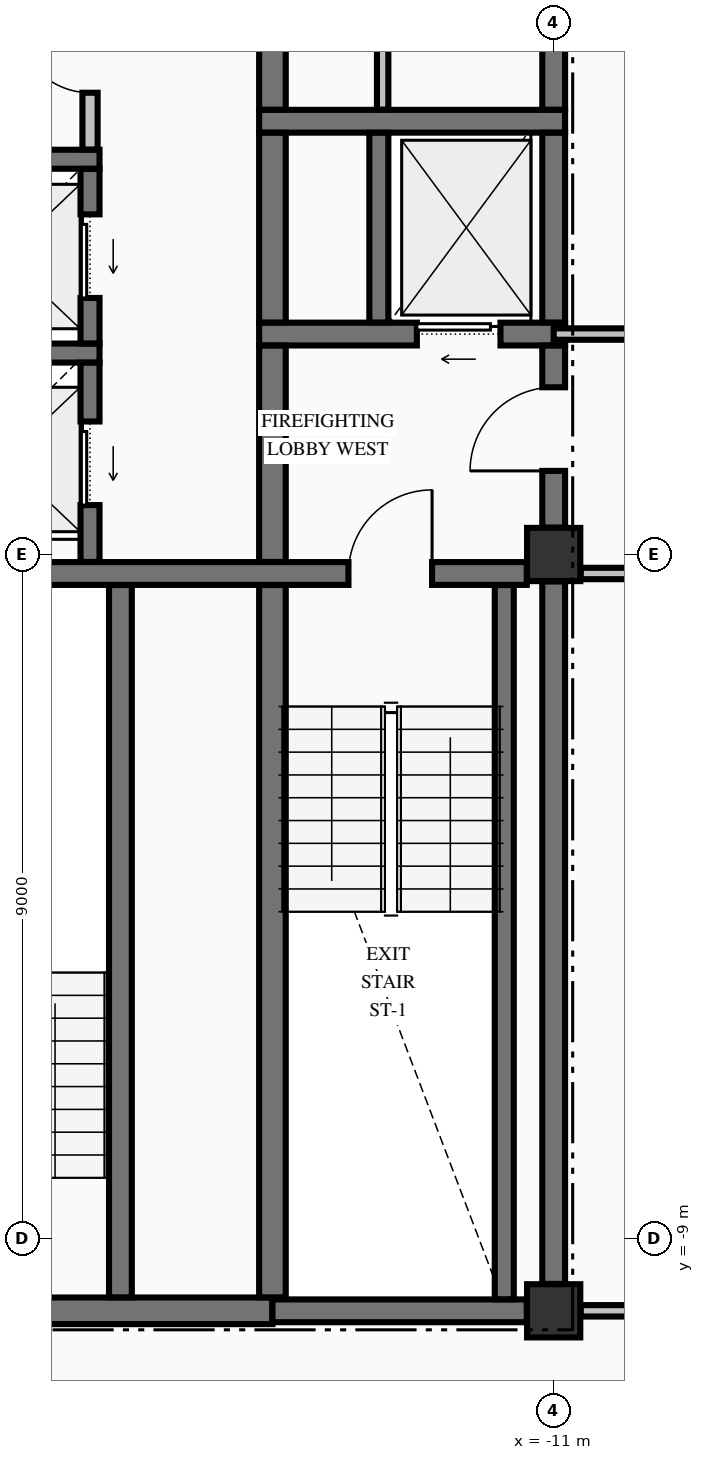
"""IFC4 building model, lengths in metres.
Left out: names, types, materials, properties, quantities, classifications, styles, units other than length and angle.
Written with IfcOpenShell. Run it as: python <this file> out.ifc"""

import sys

from ifc_helpers import new_model, si_unit, direction, frame, frame_2d, origin, origin_2d, place, context, subcontext, project, spatial, rectangle, extrude, element, fill, save


model = new_model("IFC4")
c1 = context("Model", 3, precision=1e-05, world=origin(), true_north=direction((0.0, 1.0)))
c2 = subcontext(c1, "Body", "Model", "MODEL_VIEW")
j1 = project(units=[si_unit("LENGTHUNIT", "METRE"), si_unit("PLANEANGLEUNIT", "RADIAN")], contexts=[c1])
p1 = place(None, origin())
s1 = spatial("IfcSite", under=j1, at=p1, CompositionType="ELEMENT")
p2 = place(p1, origin())
s2 = spatial("IfcBuilding", under=s1, at=p2, CompositionType="ELEMENT")
p3 = place(p2, frame((0.0, 0.0, 267.35)))
s3 = spatial("IfcBuildingStorey", under=s2, at=p3, CompositionType="ELEMENT", Elevation=267.35)
for number, where, z_axis, x_axis in (
    (1, (-11.0, -9.95, -0.25), (0.0, 0.0, 1.0), (1.0, 0.0, 0.0)),
    (2, (-11.0, 0.0, -0.25), (0.0, 0.0, 1.0), (1.0, 0.0, 0.0)),
):
    element("IfcColumn", number, at=place(p3, frame(where, z_axis=z_axis, x_axis=x_axis)), inside=s3, PredefinedType="COLUMN", context=c2, shape_type="SweptSolid", body=[
        extrude(rectangle(XDim=0.7, YDim=0.7, at=origin_2d()), origin(), (0.0, 0.0, 1.0), 3.155),
    ])
p4 = place(p3, frame((-19.646, -9.95, 0.0), z_axis=(0.0, 0.0, 1.0), x_axis=(1.0, 0.0, 0.0)))
e3 = element("IfcWall", 3, at=p4, inside=s3, PredefinedType="SHEAR", context=c2, shape_type="SweptSolid", body=[
    extrude(rectangle(XDim=4.946, YDim=0.35, at=frame_2d((2.473, 0.0))), origin(), (0.0, 0.0, 1.0), 2.905),
])
p5 = place(p4, frame((0.821, 0.0, 0.0)))
e4 = element("IfcOpeningElement", 4, at=p5, cuts=e3, PredefinedType="OPENING", context=c2, shape_type="SweptSolid", body=[
    extrude(rectangle(XDim=1.05, YDim=2.15, at=frame_2d((0.525, 1.075))), frame((0.0, 0.185, 0.0), z_axis=(0.0, -1.0, 0.0), x_axis=(1.0, 0.0, 0.0)), (0.0, 0.0, 1.0), 0.37),
])
p6 = place(p3, frame((-14.7, -9.95, 0.0), z_axis=(0.0, 0.0, 1.0), x_axis=(1.0, 0.0, 0.0)))
e5 = element("IfcWall", 5, at=p6, inside=s3, PredefinedType="SHEAR", context=c2, shape_type="SweptSolid", body=[
    extrude(rectangle(XDim=3.346, YDim=0.3, at=frame_2d((1.673, 0.0))), origin(), (0.0, 0.0, 1.0), 2.905),
])
p7 = place(p3, frame((-19.646, -0.25, 0.0), z_axis=(0.0, 0.0, 1.0), x_axis=(1.0, 0.0, 0.0)))
e6 = element("IfcWall", 6, at=p7, inside=s3, PredefinedType="SHEAR", context=c2, shape_type="SweptSolid", body=[
    extrude(rectangle(XDim=8.292, YDim=0.3, at=frame_2d((4.146, 0.0))), origin(), (0.0, 0.0, 1.0), 2.905),
])
p8 = place(p7, frame((5.946, 0.0, 0.0)))
e7 = element("IfcOpeningElement", 7, at=p8, cuts=e6, PredefinedType="OPENING", context=c2, shape_type="SweptSolid", body=[
    extrude(rectangle(XDim=1.1, YDim=2.15, at=frame_2d((0.55, 1.075))), frame((0.0, 0.16, 0.0), z_axis=(0.0, -1.0, 0.0), x_axis=(1.0, 0.0, 0.0)), (0.0, 0.0, 1.0), 0.32),
])
p9 = place(p3, frame((-20.175, 2.65, 0.0), z_axis=(0.0, 0.0, 1.0), x_axis=(1.0, 0.0, 0.0)))
e8 = element("IfcWall", 8, at=p9, inside=s3, PredefinedType="SOLIDWALL", context=c2, shape_type="SweptSolid", body=[
    extrude(rectangle(XDim=3.2, YDim=0.25, at=frame_2d((1.6, 0.0))), origin(), (0.0, 0.0, 1.0), 2.905),
])
p10 = place(p3, frame((-14.875, 2.9, 0.0), z_axis=(0.0, 0.0, 1.0), x_axis=(1.0, 0.0, 0.0)))
e9 = element("IfcWall", 9, at=p10, inside=s3, PredefinedType="SHEAR", context=c2, shape_type="SweptSolid", body=[
    extrude(rectangle(XDim=4.025, YDim=0.3, at=frame_2d((2.012, 0.0))), origin(), (0.0, 0.0, 1.0), 2.905),
])
p11 = place(p10, frame((2.075, 0.0, 0.0)))
e10 = element("IfcOpeningElement", 10, at=p11, cuts=e9, PredefinedType="OPENING", context=c2, shape_type="SweptSolid", body=[
    extrude(rectangle(XDim=1.1, YDim=2.2, at=frame_2d((0.55, 1.1))), frame((0.0, 0.16, 0.0), z_axis=(0.0, -1.0, 0.0), x_axis=(1.0, 0.0, 0.0)), (0.0, 0.0, 1.0), 0.32),
])
p12 = place(p3, frame((-20.175, 5.2, 0.0), z_axis=(0.0, 0.0, 1.0), x_axis=(1.0, 0.0, 0.0)))
e11 = element("IfcWall", 11, at=p12, inside=s3, PredefinedType="SOLIDWALL", context=c2, shape_type="SweptSolid", body=[
    extrude(rectangle(XDim=3.2, YDim=0.25, at=frame_2d((1.6, 0.0))), origin(), (0.0, 0.0, 1.0), 2.905),
])
p13 = place(p3, frame((-14.875, 5.7, 0.0), z_axis=(0.0, 0.0, 1.0), x_axis=(1.0, 0.0, 0.0)))
e12 = element("IfcWall", 12, at=p13, inside=s3, PredefinedType="SHEAR", context=c2, shape_type="SweptSolid", body=[
    extrude(rectangle(XDim=4.025, YDim=0.3, at=frame_2d((2.012, 0.0))), origin(), (0.0, 0.0, 1.0), 2.905),
])
p14 = place(p3, frame((-10.644, -9.95, 0.0), z_axis=(0.0, 0.0, 1.0), x_axis=(1.0, 0.0, 0.0)))
e13 = element("IfcWall", 13, at=p14, inside=s3, PredefinedType="PARTITIONING", context=c2, shape_type="SweptSolid", body=[
    extrude(rectangle(XDim=21.288, YDim=0.15, at=frame_2d((10.644, 0.0))), origin(), (0.0, 0.0, 1.0), 2.905),
])
p15 = place(p14, frame((14.294, 0.0, 0.0)))
e14 = element("IfcOpeningElement", 14, at=p15, cuts=e13, PredefinedType="OPENING", context=c2, shape_type="SweptSolid", body=[
    extrude(rectangle(XDim=1.1, YDim=2.15, at=frame_2d((0.55, 1.075))), frame((0.0, 0.085, 0.0), z_axis=(0.0, -1.0, 0.0), x_axis=(1.0, 0.0, 0.0)), (0.0, 0.0, 1.0), 0.17),
])
p16 = place(p14, frame((19.719, 0.0, 0.0)))
e15 = element("IfcOpeningElement", 15, at=p16, cuts=e13, PredefinedType="OPENING", context=c2, shape_type="SweptSolid", body=[
    extrude(rectangle(XDim=0.95, YDim=2.15, at=frame_2d((0.475, 1.075))), frame((0.0, 0.085, 0.0), z_axis=(0.0, -1.0, 0.0), x_axis=(1.0, 0.0, 0.0)), (0.0, 0.0, 1.0), 0.17),
])
p17 = place(p3, frame((-10.644, -0.25, 0.0), z_axis=(0.0, 0.0, 1.0), x_axis=(1.0, 0.0, 0.0)))
e16 = element("IfcWall", 16, at=p17, inside=s3, PredefinedType="PARTITIONING", context=c2, shape_type="SweptSolid", body=[
    extrude(rectangle(XDim=21.288, YDim=0.15, at=frame_2d((10.644, 0.0))), origin(), (0.0, 0.0, 1.0), 2.905),
])
p18 = place(p17, frame((14.294, 0.0, 0.0)))
e17 = element("IfcOpeningElement", 17, at=p18, cuts=e16, PredefinedType="OPENING", context=c2, shape_type="SweptSolid", body=[
    extrude(rectangle(XDim=1.1, YDim=2.15, at=frame_2d((0.55, 1.075))), frame((0.0, 0.085, 0.0), z_axis=(0.0, -1.0, 0.0), x_axis=(1.0, 0.0, 0.0)), (0.0, 0.0, 1.0), 0.17),
])
p19 = place(p17, frame((6.169, 0.0, 0.0)))
e18 = element("IfcOpeningElement", 18, at=p19, cuts=e16, PredefinedType="OPENING", context=c2, shape_type="SweptSolid", body=[
    extrude(rectangle(XDim=1.05, YDim=2.15, at=frame_2d((0.525, 1.075))), frame((0.0, 0.085, 0.0), z_axis=(0.0, -1.0, 0.0), x_axis=(1.0, 0.0, 0.0)), (0.0, 0.0, 1.0), 0.17),
])
p20 = place(p17, frame((18.319, 0.0, 0.0)))
e19 = element("IfcOpeningElement", 19, at=p20, cuts=e16, PredefinedType="OPENING", context=c2, shape_type="SweptSolid", body=[
    extrude(rectangle(XDim=0.95, YDim=2.15, at=frame_2d((0.475, 1.075))), frame((0.0, 0.085, 0.0), z_axis=(0.0, -1.0, 0.0), x_axis=(1.0, 0.0, 0.0)), (0.0, 0.0, 1.0), 0.17),
])
p21 = place(p3, frame((-11.0, 2.9, 0.0), z_axis=(0.0, 0.0, 1.0), x_axis=(1.0, 0.0, 0.0)))
e20 = element("IfcWall", 20, at=p21, inside=s3, PredefinedType="PARTITIONING", context=c2, shape_type="SweptSolid", body=[
    extrude(rectangle(XDim=22.0, YDim=0.15, at=frame_2d((11.0, 0.0))), origin(), (0.0, 0.0, 1.0), 2.905),
])
p22 = place(p21, frame((14.65, 0.0, 0.0)))
e21 = element("IfcOpeningElement", 21, at=p22, cuts=e20, PredefinedType="OPENING", context=c2, shape_type="SweptSolid", body=[
    extrude(rectangle(XDim=1.1, YDim=2.15, at=frame_2d((0.55, 1.075))), frame((0.0, 0.085, 0.0), z_axis=(0.0, -1.0, 0.0), x_axis=(1.0, 0.0, 0.0)), (0.0, 0.0, 1.0), 0.17),
])
p23 = place(p21, frame((6.525, 0.0, 0.0)))
e22 = element("IfcOpeningElement", 22, at=p23, cuts=e20, PredefinedType="OPENING", context=c2, shape_type="SweptSolid", body=[
    extrude(rectangle(XDim=1.05, YDim=2.15, at=frame_2d((0.525, 1.075))), frame((0.0, 0.085, 0.0), z_axis=(0.0, -1.0, 0.0), x_axis=(1.0, 0.0, 0.0)), (0.0, 0.0, 1.0), 0.17),
])
p24 = place(p21, frame((18.6, 0.0, 0.0)))
e23 = element("IfcOpeningElement", 23, at=p24, cuts=e20, PredefinedType="OPENING", context=c2, shape_type="SweptSolid", body=[
    extrude(rectangle(XDim=1.1, YDim=2.15, at=frame_2d((0.55, 1.075))), frame((0.0, 0.085, 0.0), z_axis=(0.0, -1.0, 0.0), x_axis=(1.0, 0.0, 0.0)), (0.0, 0.0, 1.0), 0.17),
])
p25 = place(p3, frame((-17.1, -0.098, 0.0), z_axis=(0.0, 0.0, 1.0), x_axis=(0.0, 1.0, 0.0)))
e24 = element("IfcWall", 24, at=p25, inside=s3, PredefinedType="SOLIDWALL", context=c2, shape_type="SweptSolid", body=[
    extrude(rectangle(XDim=2.621, YDim=0.25, at=frame_2d((1.311, 0.0))), origin(), (0.0, 0.0, 1.0), 2.905),
])
p26 = place(p25, frame((0.748, 0.0, 0.0)))
e25 = element("IfcOpeningElement", 25, at=p26, cuts=e24, PredefinedType="OPENING", context=c2, shape_type="SweptSolid", body=[
    extrude(rectangle(XDim=1.1, YDim=2.2, at=frame_2d((0.55, 1.1))), frame((0.0, 0.135, 0.0), z_axis=(0.0, -1.0, 0.0), x_axis=(1.0, 0.0, 0.0)), (0.0, 0.0, 1.0), 0.27),
])
p27 = place(p3, frame((-17.1, 2.777, 0.0), z_axis=(0.0, 0.0, 1.0), x_axis=(0.0, 1.0, 0.0)))
e26 = element("IfcWall", 26, at=p27, inside=s3, PredefinedType="SOLIDWALL", context=c2, shape_type="SweptSolid", body=[
    extrude(rectangle(XDim=2.296, YDim=0.25, at=frame_2d((1.148, 0.0))), origin(), (0.0, 0.0, 1.0), 2.905),
])
p28 = place(p27, frame((0.598, 0.0, 0.0)))
e27 = element("IfcOpeningElement", 27, at=p28, cuts=e26, PredefinedType="OPENING", context=c2, shape_type="SweptSolid", body=[
    extrude(rectangle(XDim=1.1, YDim=2.2, at=frame_2d((0.55, 1.1))), frame((0.0, 0.135, 0.0), z_axis=(0.0, -1.0, 0.0), x_axis=(1.0, 0.0, 0.0)), (0.0, 0.0, 1.0), 0.27),
])
p29 = place(p3, frame((-16.7, -9.773, 0.0), z_axis=(0.0, 0.0, 1.0), x_axis=(0.0, 1.0, 0.0)))
e28 = element("IfcWall", 28, at=p29, inside=s3, PredefinedType="SHEAR", context=c2, shape_type="SweptSolid", body=[
    extrude(rectangle(XDim=9.371, YDim=0.3, at=frame_2d((4.686, 0.0))), origin(), (0.0, 0.0, 1.0), 2.905),
])
p30 = place(p3, frame((-14.7, -9.773, 0.0), z_axis=(0.0, 0.0, 1.0), x_axis=(0.0, 1.0, 0.0)))
e29 = element("IfcWall", 29, at=p30, inside=s3, PredefinedType="SHEAR", context=c2, shape_type="SweptSolid", body=[
    extrude(rectangle(XDim=9.371, YDim=0.35, at=frame_2d((4.686, 0.0))), origin(), (0.0, 0.0, 1.0), 2.905),
])
p31 = place(p3, frame((-14.7, -0.098, 0.0), z_axis=(0.0, 0.0, 1.0), x_axis=(0.0, 1.0, 0.0)))
e30 = element("IfcWall", 30, at=p31, inside=s3, PredefinedType="SHEAR", context=c2, shape_type="SweptSolid", body=[
    extrude(rectangle(XDim=2.846, YDim=0.35, at=frame_2d((1.423, 0.0))), origin(), (0.0, 0.0, 1.0), 2.905),
])
p32 = place(p3, frame((-14.7, 3.052, 0.0), z_axis=(0.0, 0.0, 1.0), x_axis=(0.0, 1.0, 0.0)))
e31 = element("IfcWall", 31, at=p32, inside=s3, PredefinedType="SHEAR", context=c2, shape_type="SweptSolid", body=[
    extrude(rectangle(XDim=2.496, YDim=0.35, at=frame_2d((1.248, 0.0))), origin(), (0.0, 0.0, 1.0), 2.905),
])
p33 = place(p3, frame((-14.7, 5.852, 0.0), z_axis=(0.0, 0.0, 1.0), x_axis=(0.0, 1.0, 0.0)))
e32 = element("IfcWall", 32, at=p33, inside=s3, PredefinedType="SHEAR", context=c2, shape_type="SweptSolid", body=[
    extrude(rectangle(XDim=4.471, YDim=0.35, at=frame_2d((2.235, 0.0))), origin(), (0.0, 0.0, 1.0), 2.905),
])
p34 = place(p3, frame((-13.3, 3.052, 0.0), z_axis=(0.0, 0.0, 1.0), x_axis=(0.0, 1.0, 0.0)))
e33 = element("IfcWall", 33, at=p34, inside=s3, PredefinedType="SOLIDWALL", context=c2, shape_type="SweptSolid", body=[
    extrude(rectangle(XDim=2.496, YDim=0.25, at=frame_2d((1.248, 0.0))), origin(), (0.0, 0.0, 1.0), 2.905),
])
p35 = place(p3, frame((-11.65, -9.798, 0.0), z_axis=(0.0, 0.0, 1.0), x_axis=(0.0, 1.0, 0.0)))
e34 = element("IfcWall", 34, at=p35, inside=s3, PredefinedType="SOLIDWALL", context=c2, shape_type="SweptSolid", body=[
    extrude(rectangle(XDim=9.396, YDim=0.25, at=frame_2d((4.698, 0.0))), origin(), (0.0, 0.0, 1.0), 2.905),
])
p36 = place(p3, frame((-11.0, -9.596, 0.0), z_axis=(0.0, 0.0, 1.0), x_axis=(0.0, 1.0, 0.0)))
e35 = element("IfcWall", 35, at=p36, inside=s3, PredefinedType="SHEAR", context=c2, shape_type="SweptSolid", body=[
    extrude(rectangle(XDim=9.242, YDim=0.3, at=frame_2d((4.621, 0.0))), origin(), (0.0, 0.0, 1.0), 2.905),
])
p37 = place(p3, frame((-11.0, 0.354, 0.0), z_axis=(0.0, 0.0, 1.0), x_axis=(0.0, 1.0, 0.0)))
e36 = element("IfcWall", 36, at=p37, inside=s3, PredefinedType="SHEAR", context=c2, shape_type="SweptSolid", body=[
    extrude(rectangle(XDim=2.394, YDim=0.3, at=frame_2d((1.197, 0.0))), origin(), (0.0, 0.0, 1.0), 2.905),
])
p38 = place(p37, frame((0.746, 0.0, 0.0)))
e37 = element("IfcOpeningElement", 37, at=p38, cuts=e36, PredefinedType="OPENING", context=c2, shape_type="SweptSolid", body=[
    extrude(rectangle(XDim=1.1, YDim=2.15, at=frame_2d((0.55, 1.075))), frame((0.0, 0.16, 0.0), z_axis=(0.0, -1.0, 0.0), x_axis=(1.0, 0.0, 0.0)), (0.0, 0.0, 1.0), 0.32),
])
p39 = place(p3, frame((-11.0, 3.052, 0.0), z_axis=(0.0, 0.0, 1.0), x_axis=(0.0, 1.0, 0.0)))
e38 = element("IfcWall", 38, at=p39, inside=s3, PredefinedType="SHEAR", context=c2, shape_type="SweptSolid", body=[
    extrude(rectangle(XDim=2.496, YDim=0.3, at=frame_2d((1.248, 0.0))), origin(), (0.0, 0.0, 1.0), 2.905),
])
p40 = place(p3, frame((-11.0, 5.852, 0.0), z_axis=(0.0, 0.0, 1.0), x_axis=(0.0, 1.0, 0.0)))
e39 = element("IfcWall", 39, at=p40, inside=s3, PredefinedType="SHEAR", context=c2, shape_type="SweptSolid", body=[
    extrude(rectangle(XDim=4.294, YDim=0.3, at=frame_2d((2.147, 0.0))), origin(), (0.0, 0.0, 1.0), 2.905),
])
p41 = place(p3, frame((-17.1, 5.328, 0.0), z_axis=(0.0, 0.0, 1.0), x_axis=(0.0, 1.0, 0.0)))
e40 = element("IfcWall", 40, at=p41, inside=s3, PredefinedType="PARTITIONING", context=c2, shape_type="SweptSolid", body=[
    extrude(rectangle(XDim=2.444, YDim=0.2, at=frame_2d((1.222, 0.0))), origin(), (0.0, 0.0, 1.0), 2.905),
])
p42 = place(p41, frame((0.747, 0.0, 0.0)))
e41 = element("IfcOpeningElement", 41, at=p42, cuts=e40, PredefinedType="OPENING", context=c2, shape_type="SweptSolid", body=[
    extrude(rectangle(XDim=0.95, YDim=2.15, at=frame_2d((0.475, 1.075))), frame((0.0, 0.11, 0.0), z_axis=(0.0, -1.0, 0.0), x_axis=(1.0, 0.0, 0.0)), (0.0, 0.0, 1.0), 0.22),
])
p43 = place(p3, frame((-13.25, 5.853, 0.0), z_axis=(0.0, 0.0, 1.0), x_axis=(0.0, 1.0, 0.0)))
e42 = element("IfcWall", 42, at=p43, inside=s3, PredefinedType="PARTITIONING", context=c2, shape_type="SweptSolid", body=[
    extrude(rectangle(XDim=4.494, YDim=0.15, at=frame_2d((2.247, 0.0))), origin(), (0.0, 0.0, 1.0), 2.905),
])
p44 = place(p43, frame((1.472, 0.0, 0.0)))
e43 = element("IfcOpeningElement", 43, at=p44, cuts=e42, PredefinedType="OPENING", context=c2, shape_type="SweptSolid", body=[
    extrude(rectangle(XDim=0.95, YDim=2.15, at=frame_2d((0.475, 1.075))), frame((0.0, 0.085, 0.0), z_axis=(0.0, -1.0, 0.0), x_axis=(1.0, 0.0, 0.0)), (0.0, 0.0, 1.0), 0.17),
])
p45 = place(p8, origin())
e44 = element("IfcDoor", 44, at=p45, inside=s3, OperationType="SINGLE_SWING_RIGHT", PredefinedType="DOOR", context=c2, shape_type="SweptSolid", body=[
    extrude(rectangle(XDim=1.1, YDim=2.15, at=frame_2d((0.55, 1.075))), frame((0.0, 0.025, 0.0), z_axis=(0.0, -1.0, 0.0), x_axis=(1.0, 0.0, 0.0)), (0.0, 0.0, 1.0), 0.05),
])
fill(e7, e44)
p46 = place(p38, origin())
e45 = element("IfcDoor", 45, at=p46, inside=s3, OperationType="SINGLE_SWING_LEFT", PredefinedType="DOOR", context=c2, shape_type="SweptSolid", body=[
    extrude(rectangle(XDim=1.1, YDim=2.15, at=frame_2d((0.55, 1.075))), frame((0.0, 0.025, 0.0), z_axis=(0.0, -1.0, 0.0), x_axis=(1.0, 0.0, 0.0)), (0.0, 0.0, 1.0), 0.05),
])
fill(e37, e45)
p47 = place(p11, origin())
e46 = element("IfcDoor", 46, at=p47, inside=s3, OperationType="SLIDING_TO_LEFT", PredefinedType="DOOR", context=c2, shape_type="SweptSolid", body=[
    extrude(rectangle(XDim=1.1, YDim=2.2, at=frame_2d((0.55, 1.1))), frame((0.0, 0.025, 0.0), z_axis=(0.0, -1.0, 0.0), x_axis=(1.0, 0.0, 0.0)), (0.0, 0.0, 1.0), 0.05),
])
fill(e10, e46)
p48 = place(p26, origin())
e47 = element("IfcDoor", 47, at=p48, inside=s3, OperationType="SLIDING_TO_LEFT", PredefinedType="DOOR", context=c2, shape_type="SweptSolid", body=[
    extrude(rectangle(XDim=1.1, YDim=2.2, at=frame_2d((0.55, 1.1))), frame((0.0, 0.025, 0.0), z_axis=(0.0, -1.0, 0.0), x_axis=(1.0, 0.0, 0.0)), (0.0, 0.0, 1.0), 0.05),
])
fill(e25, e47)
p49 = place(p28, origin())
e48 = element("IfcDoor", 48, at=p49, inside=s3, OperationType="SLIDING_TO_LEFT", PredefinedType="DOOR", context=c2, shape_type="SweptSolid", body=[
    extrude(rectangle(XDim=1.1, YDim=2.2, at=frame_2d((0.55, 1.1))), frame((0.0, 0.025, 0.0), z_axis=(0.0, -1.0, 0.0), x_axis=(1.0, 0.0, 0.0)), (0.0, 0.0, 1.0), 0.05),
])
fill(e27, e48)
p50 = place(p42, origin())
e49 = element("IfcDoor", 49, at=p50, inside=s3, OperationType="SINGLE_SWING_RIGHT", PredefinedType="DOOR", context=c2, shape_type="SweptSolid", body=[
    extrude(rectangle(XDim=0.95, YDim=2.15, at=frame_2d((0.475, 1.075))), frame((0.0, 0.025, 0.0), z_axis=(0.0, -1.0, 0.0), x_axis=(1.0, 0.0, 0.0)), (0.0, 0.0, 1.0), 0.05),
])
fill(e41, e49)
save(model, sys.argv[1])
